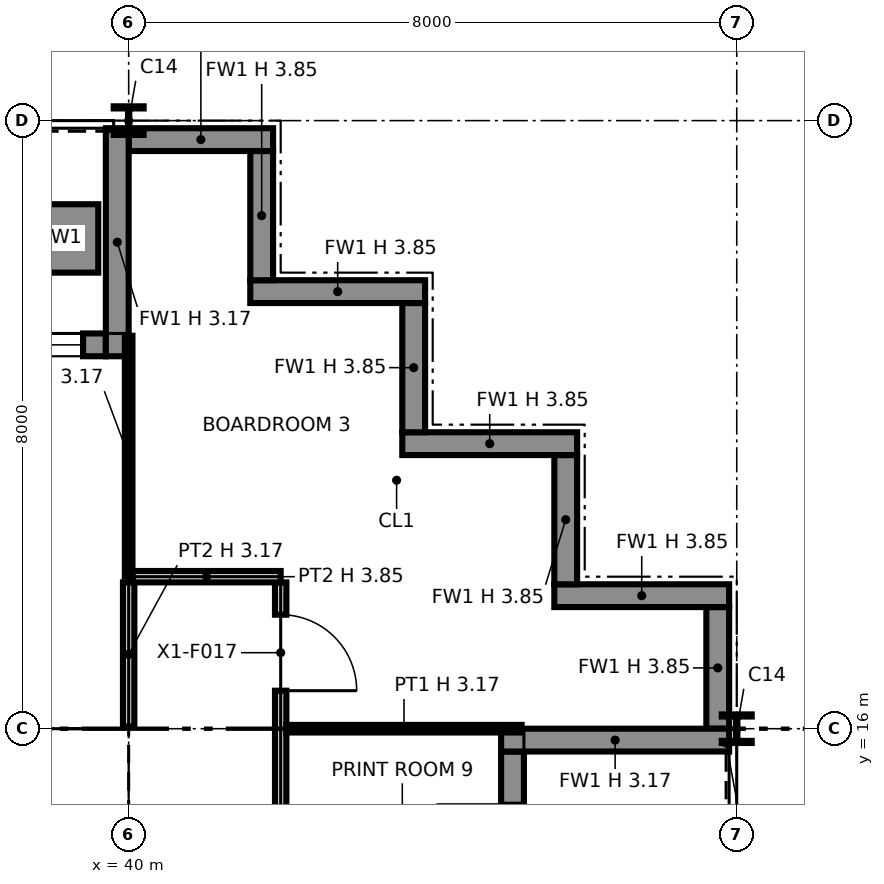
"""IFC4 building model, lengths in metres.
Left out: names, types, materials, properties, quantities, classifications, styles, units other than length and angle.
Written with IfcOpenShell. Run it as: python <this file> out.ifc"""

import sys

from ifc_helpers import new_model, si_unit, direction, frame, frame_2d, origin, origin_2d, place, context, subcontext, project, spatial, polyline, rectangle, i_section, outline, extrude, element, fill, save


model = new_model("IFC4")
c1 = context("Model", 3, precision=1e-05, world=origin(), true_north=direction((0.0, 1.0)))
c2 = subcontext(c1, "Body", "Model", "MODEL_VIEW")
j1 = project(units=[si_unit("LENGTHUNIT", "METRE"), si_unit("PLANEANGLEUNIT", "RADIAN")], contexts=[c1])
p1 = place(None, origin())
s1 = spatial("IfcSite", under=j1, at=p1, CompositionType="ELEMENT")
p2 = place(p1, origin())
s2 = spatial("IfcBuilding", under=s1, at=p2, CompositionType="ELEMENT")
p3 = place(p2, frame((0.0, 0.0, 251.0)))
s3 = spatial("IfcBuildingStorey", under=s2, at=p3, CompositionType="ELEMENT", Elevation=251.0)
p4 = place(p3, frame((40.0, 16.0, 0.0), z_axis=(0.0, 0.0, 1.0), x_axis=(1.0, 0.0, 0.0)))
e1 = element("IfcColumn", 1, at=p4, inside=s3, PredefinedType="COLUMN", context=c2, shape_type="SweptSolid", body=[
    extrude(i_section(OverallWidth=0.371, OverallDepth=0.361, WebThickness=0.012, FlangeThickness=0.02, at=origin_2d()), origin(), (0.0, 0.0, 1.0), 3.85),
])
for number, where, z_axis, x_axis in (
    (2, (40.0, 24.0, 0.0), (0.0, 0.0, 1.0), (1.0, 0.0, 0.0)),
    (3, (48.0, 16.0, 0.0), (0.0, 0.0, 1.0), (1.0, 0.0, 0.0)),
):
    element("IfcColumn", number, at=place(p3, frame(where, z_axis=z_axis, x_axis=x_axis)), inside=s3, PredefinedType="COLUMN", context=c2, shape_type="SweptSolid", body=[
        extrude(i_section(OverallWidth=0.394, OverallDepth=0.376, WebThickness=0.017, FlangeThickness=0.028, at=origin_2d()), origin(), (0.0, 0.0, 1.0), 3.85),
    ])
p5 = place(p3, frame((45.05, 8.3, 0.0), z_axis=(0.0, 0.0, 1.0), x_axis=(0.0, 1.0, 0.0)))
e4 = element("IfcWall", 4, at=p5, inside=s3, PredefinedType="SOLIDWALL", context=c2, shape_type="SweptSolid", body=[
    extrude(rectangle(XDim=7.4, YDim=0.3, at=frame_2d((3.7, 0.0))), origin(), (0.0, 0.0, 1.0), 3.85),
])
p6 = place(p5, frame((0.3, 0.0, 0.9)))
e5 = element("IfcOpeningElement", 5, at=p6, cuts=e4, PredefinedType="OPENING", context=c2, shape_type="SweptSolid", body=[
    extrude(rectangle(XDim=2.8, YDim=2.2, at=frame_2d((1.4, 1.1))), frame((0.0, 0.16, 0.0), z_axis=(0.0, -1.0, 0.0), x_axis=(1.0, 0.0, 0.0)), (0.0, 0.0, 1.0), 0.32),
])
p7 = place(p5, frame((4.7, 0.0, 0.0)))
e6 = element("IfcOpeningElement", 6, at=p7, cuts=e4, PredefinedType="OPENING", context=c2, shape_type="SweptSolid", body=[
    extrude(rectangle(XDim=2.0, YDim=2.4, at=frame_2d((1.0, 1.2))), frame((0.0, 0.16, 0.0), z_axis=(0.0, -1.0, 0.0), x_axis=(1.0, 0.0, 0.0)), (0.0, 0.0, 1.0), 0.32),
])
p8 = place(p3, frame((47.9, 15.85, 0.0), z_axis=(0.0, 0.0, 1.0), x_axis=(-1.0, 0.0, 0.0)))
e7 = element("IfcWall", 7, at=p8, inside=s3, PredefinedType="SOLIDWALL", context=c2, shape_type="SweptSolid", body=[
    extrude(rectangle(XDim=3.0, YDim=0.3, at=frame_2d((1.5, 0.0))), origin(), (0.0, 0.0, 1.0), 3.171),
])
p9 = place(p3, frame((47.75, 16.0, 0.0), z_axis=(0.0, 0.0, 1.0), x_axis=(0.0, 1.0, 0.0)))
e8 = element("IfcWall", 8, at=p9, inside=s3, PredefinedType="SOLIDWALL", context=c2, shape_type="SweptSolid", body=[
    extrude(rectangle(XDim=1.6, YDim=0.3, at=frame_2d((0.8, 0.0))), origin(), (0.0, 0.0, 1.0), 3.85),
])
p10 = place(p3, frame((47.9, 17.75, 0.0), z_axis=(0.0, 0.0, 1.0), x_axis=(-1.0, 0.0, 0.0)))
e9 = element("IfcWall", 9, at=p10, inside=s3, PredefinedType="SOLIDWALL", context=c2, shape_type="SweptSolid", body=[
    extrude(rectangle(XDim=2.3, YDim=0.3, at=frame_2d((1.15, 0.0))), origin(), (0.0, 0.0, 1.0), 3.85),
])
p11 = place(p3, frame((45.75, 17.9, 0.0), z_axis=(0.0, 0.0, 1.0), x_axis=(0.0, 1.0, 0.0)))
e10 = element("IfcWall", 10, at=p11, inside=s3, PredefinedType="SOLIDWALL", context=c2, shape_type="SweptSolid", body=[
    extrude(rectangle(XDim=1.7, YDim=0.3, at=frame_2d((0.85, 0.0))), origin(), (0.0, 0.0, 1.0), 3.85),
])
p12 = place(p3, frame((45.9, 19.75, 0.0), z_axis=(0.0, 0.0, 1.0), x_axis=(-1.0, 0.0, 0.0)))
e11 = element("IfcWall", 11, at=p12, inside=s3, PredefinedType="SOLIDWALL", context=c2, shape_type="SweptSolid", body=[
    extrude(rectangle(XDim=2.3, YDim=0.3, at=frame_2d((1.15, 0.0))), origin(), (0.0, 0.0, 1.0), 3.85),
])
p13 = place(p3, frame((43.75, 19.9, 0.0), z_axis=(0.0, 0.0, 1.0), x_axis=(0.0, 1.0, 0.0)))
e12 = element("IfcWall", 12, at=p13, inside=s3, PredefinedType="SOLIDWALL", context=c2, shape_type="SweptSolid", body=[
    extrude(rectangle(XDim=1.7, YDim=0.3, at=frame_2d((0.85, 0.0))), origin(), (0.0, 0.0, 1.0), 3.85),
])
p14 = place(p3, frame((43.9, 21.75, 0.0), z_axis=(0.0, 0.0, 1.0), x_axis=(-1.0, 0.0, 0.0)))
e13 = element("IfcWall", 13, at=p14, inside=s3, PredefinedType="SOLIDWALL", context=c2, shape_type="SweptSolid", body=[
    extrude(rectangle(XDim=2.3, YDim=0.3, at=frame_2d((1.15, 0.0))), origin(), (0.0, 0.0, 1.0), 3.85),
])
p15 = place(p3, frame((41.75, 21.9, 0.0), z_axis=(0.0, 0.0, 1.0), x_axis=(0.0, 1.0, 0.0)))
e14 = element("IfcWall", 14, at=p15, inside=s3, PredefinedType="SOLIDWALL", context=c2, shape_type="SweptSolid", body=[
    extrude(rectangle(XDim=1.7, YDim=0.3, at=frame_2d((0.85, 0.0))), origin(), (0.0, 0.0, 1.0), 3.85),
])
p16 = place(p3, frame((41.9, 23.75, 0.0), z_axis=(0.0, 0.0, 1.0), x_axis=(-1.0, 0.0, 0.0)))
e15 = element("IfcWall", 15, at=p16, inside=s3, PredefinedType="SOLIDWALL", context=c2, shape_type="SweptSolid", body=[
    extrude(rectangle(XDim=1.9, YDim=0.3, at=frame_2d((0.95, 0.0))), origin(), (0.0, 0.0, 1.0), 3.85),
])
p17 = place(p3, frame((39.7, 21.05, 0.0), z_axis=(0.0, 0.0, 1.0), x_axis=(-1.0, 0.0, 0.0)))
e16 = element("IfcWall", 16, at=p17, inside=s3, PredefinedType="SOLIDWALL", context=c2, shape_type="SweptSolid", body=[
    extrude(rectangle(XDim=7.4, YDim=0.3, at=frame_2d((3.7, 0.0))), origin(), (0.0, 0.0, 1.0), 3.85),
])
p18 = place(p17, frame((0.3, 0.0, 0.9)))
e17 = element("IfcOpeningElement", 17, at=p18, cuts=e16, PredefinedType="OPENING", context=c2, shape_type="SweptSolid", body=[
    extrude(rectangle(XDim=2.8, YDim=2.2, at=frame_2d((1.4, 1.1))), frame((0.0, 0.16, 0.0), z_axis=(0.0, -1.0, 0.0), x_axis=(1.0, 0.0, 0.0)), (0.0, 0.0, 1.0), 0.32),
])
p19 = place(p17, frame((4.7, 0.0, 0.0)))
e18 = element("IfcOpeningElement", 18, at=p19, cuts=e16, PredefinedType="OPENING", context=c2, shape_type="SweptSolid", body=[
    extrude(rectangle(XDim=2.0, YDim=2.4, at=frame_2d((1.0, 1.2))), frame((0.0, 0.16, 0.0), z_axis=(0.0, -1.0, 0.0), x_axis=(1.0, 0.0, 0.0)), (0.0, 0.0, 1.0), 0.32),
])
p20 = place(p3, frame((39.85, 23.9, 0.0), z_axis=(0.0, 0.0, 1.0), x_axis=(0.0, -1.0, 0.0)))
e19 = element("IfcWall", 19, at=p20, inside=s3, PredefinedType="SOLIDWALL", context=c2, shape_type="SweptSolid", body=[
    extrude(rectangle(XDim=3.0, YDim=0.3, at=frame_2d((1.5, 0.0))), origin(), (0.0, 0.0, 1.0), 3.171),
])
p21 = place(p3, frame((39.6, 22.45, 0.0), z_axis=(0.0, 0.0, 1.0), x_axis=(-1.0, 0.0, 0.0)))
e20 = element("IfcWall", 20, at=p21, inside=s3, PredefinedType="SOLIDWALL", context=c2, shape_type="SweptSolid", body=[
    extrude(rectangle(XDim=3.2, YDim=0.9, at=frame_2d((1.6, 0.0))), origin(), (0.0, 0.0, 1.0), 0.6),
])
p22 = place(p3, frame((24.65, 15.25, 0.0), z_axis=(0.0, 0.0, 1.0), x_axis=(1.0, 0.0, 0.0)))
e21 = element("IfcWall", 21, at=p22, inside=s3, PredefinedType="PARTITIONING", context=c2, shape_type="SweptSolid", body=[
    extrude(outline(polyline([(0.0, 0.0), (14.7, 0.0), (14.7, 3.85), (7.438, 3.85), (7.438, 3.308), (7.262, 3.308), (7.261, 3.85), (0.0, 3.85), (0.0, 0.0)])), frame((0.0, 0.1, 0.0), z_axis=(0.0, -1.0, 0.0), x_axis=(1.0, 0.0, 0.0)), (0.0, 0.0, 1.0), 0.2),
])
p23 = place(p22, frame((2.85, 0.0, 0.0)))
e22 = element("IfcOpeningElement", 22, at=p23, cuts=e21, PredefinedType="OPENING", context=c2, shape_type="SweptSolid", body=[
    extrude(rectangle(XDim=1.8, YDim=2.1, at=frame_2d((0.9, 1.05))), frame((0.0, 0.11, 0.0), z_axis=(0.0, -1.0, 0.0), x_axis=(1.0, 0.0, 0.0)), (0.0, 0.0, 1.0), 0.22),
])
p24 = place(p22, frame((9.95, 0.0, 0.0), z_axis=(0.0, 0.0, 1.0), x_axis=(-1.0, 0.0, 0.0)))
e23 = element("IfcOpeningElement", 23, at=p24, cuts=e21, PredefinedType="OPENING", context=c2, shape_type="SweptSolid", body=[
    extrude(rectangle(XDim=1.4, YDim=2.1, at=frame_2d((0.7, 1.05))), frame((0.0, 0.11, 0.0), z_axis=(0.0, -1.0, 0.0), x_axis=(1.0, 0.0, 0.0)), (0.0, 0.0, 1.0), 0.22),
])
p25 = place(p22, frame((13.4, 0.0, 0.0), z_axis=(0.0, 0.0, 1.0), x_axis=(-1.0, 0.0, 0.0)))
e24 = element("IfcOpeningElement", 24, at=p25, cuts=e21, PredefinedType="OPENING", context=c2, shape_type="SweptSolid", body=[
    extrude(rectangle(XDim=1.4, YDim=2.1, at=frame_2d((0.7, 1.05))), frame((0.0, 0.11, 0.0), z_axis=(0.0, -1.0, 0.0), x_axis=(1.0, 0.0, 0.0)), (0.0, 0.0, 1.0), 0.22),
])
p26 = place(p3, frame((39.25, 8.85, 0.0), z_axis=(0.0, 0.0, 1.0), x_axis=(0.0, 1.0, 0.0)))
e25 = element("IfcWall", 25, at=p26, inside=s3, PredefinedType="PARTITIONING", context=c2, shape_type="SweptSolid", body=[
    extrude(rectangle(XDim=6.3, YDim=0.2, at=frame_2d((3.15, 0.0))), origin(), (0.0, 0.0, 1.0), 3.85),
])
p27 = place(p3, frame((42.0, 6.0, 0.0), z_axis=(0.0, 0.0, 1.0), x_axis=(0.0, 1.0, 0.0)))
e26 = element("IfcWall", 26, at=p27, inside=s3, PredefinedType="PARTITIONING", context=c2, shape_type="SweptSolid", body=[
    extrude(outline(polyline([(0.0, 0.0), (11.925, 0.0), (11.925, 3.85), (10.3, 3.85), (10.298, 3.172), (9.702, 3.172), (9.7, 3.85), (6.3, 3.85), (6.298, 3.172), (5.702, 3.172), (5.7, 3.85), (2.3, 3.85), (2.298, 3.172), (1.702, 3.172), (1.7, 3.85), (0.0, 3.85), (0.0, 0.0)])), frame((0.0, 0.075, 0.0), z_axis=(0.0, -1.0, 0.0), x_axis=(1.0, 0.0, 0.0)), (0.0, 0.0, 1.0), 0.15),
])
p28 = place(p27, frame((4.5, 0.0, 0.0), z_axis=(0.0, 0.0, 1.0), x_axis=(-1.0, 0.0, 0.0)))
e27 = element("IfcOpeningElement", 27, at=p28, cuts=e26, PredefinedType="OPENING", context=c2, shape_type="SweptSolid", body=[
    extrude(rectangle(XDim=1.0, YDim=2.1, at=frame_2d((0.5, 1.05))), frame((0.0, 0.085, 0.0), z_axis=(0.0, -1.0, 0.0), x_axis=(1.0, 0.0, 0.0)), (0.0, 0.0, 1.0), 0.17),
])
p29 = place(p27, frame((8.5, 0.0, 0.0), z_axis=(0.0, 0.0, 1.0), x_axis=(-1.0, 0.0, 0.0)))
e28 = element("IfcOpeningElement", 28, at=p29, cuts=e26, PredefinedType="OPENING", context=c2, shape_type="SweptSolid", body=[
    extrude(rectangle(XDim=1.0, YDim=2.1, at=frame_2d((0.5, 1.05))), frame((0.0, 0.085, 0.0), z_axis=(0.0, -1.0, 0.0), x_axis=(1.0, 0.0, 0.0)), (0.0, 0.0, 1.0), 0.17),
])
p30 = place(p27, frame((11.5, 0.0, 0.0), z_axis=(0.0, 0.0, 1.0), x_axis=(-1.0, 0.0, 0.0)))
e29 = element("IfcOpeningElement", 29, at=p30, cuts=e26, PredefinedType="OPENING", context=c2, shape_type="SweptSolid", body=[
    extrude(rectangle(XDim=1.0, YDim=2.1, at=frame_2d((0.5, 1.05))), frame((0.0, 0.085, 0.0), z_axis=(0.0, -1.0, 0.0), x_axis=(1.0, 0.0, 0.0)), (0.0, 0.0, 1.0), 0.17),
])
p31 = place(p3, frame((42.075, 16.0, 0.0), z_axis=(0.0, 0.0, 1.0), x_axis=(1.0, 0.0, 0.0)))
e30 = element("IfcWall", 30, at=p31, inside=s3, PredefinedType="PARTITIONING", context=c2, shape_type="SweptSolid", body=[
    extrude(rectangle(XDim=3.095, YDim=0.1, at=frame_2d((1.547, 0.0))), origin(), (0.0, 0.0, 1.0), 3.172),
])
p32 = place(p3, frame((40.0, 16.03, 0.0), z_axis=(0.0, 0.0, 1.0), x_axis=(0.0, 1.0, 0.0)))
e31 = element("IfcWall", 31, at=p32, inside=s3, PredefinedType="PARTITIONING", context=c2, shape_type="SweptSolid", body=[
    extrude(rectangle(XDim=1.895, YDim=0.15, at=frame_2d((0.948, 0.0))), origin(), (0.0, 0.0, 1.0), 3.172),
])
p33 = place(p3, frame((40.05, 18.0, 0.0), z_axis=(0.0, 0.0, 1.0), x_axis=(1.0, 0.0, 0.0)))
e32 = element("IfcWall", 32, at=p33, inside=s3, PredefinedType="PARTITIONING", context=c2, shape_type="SweptSolid", body=[
    extrude(rectangle(XDim=1.95, YDim=0.15, at=frame_2d((0.975, 0.0))), origin(), (0.0, 0.0, 1.0), 3.85),
])
p34 = place(p3, frame((40.0, 18.0, 0.0), z_axis=(0.0, 0.0, 1.0), x_axis=(0.0, 1.0, 0.0)))
e33 = element("IfcWall", 33, at=p34, inside=s3, PredefinedType="PARTITIONING", context=c2, shape_type="SweptSolid", body=[
    extrude(rectangle(XDim=3.17, YDim=0.1, at=frame_2d((1.585, 0.0))), origin(), (0.0, 0.0, 1.0), 3.172),
])
p35 = place(p18, origin())
e34 = element("IfcWindow", 34, at=p35, inside=s3, PartitioningType="SINGLE_PANEL", PredefinedType="WINDOW", context=c2, shape_type="SweptSolid", body=[
    extrude(rectangle(XDim=2.8, YDim=2.2, at=frame_2d((1.4, 1.1))), frame((0.0, 0.03, 0.0), z_axis=(0.0, -1.0, 0.0), x_axis=(1.0, 0.0, 0.0)), (0.0, 0.0, 1.0), 0.06),
])
fill(e17, e34)
p36 = place(p30, origin())
e35 = element("IfcDoor", 35, at=p36, inside=s3, OperationType="SINGLE_SWING_RIGHT", PredefinedType="DOOR", context=c2, shape_type="SweptSolid", body=[
    extrude(rectangle(XDim=1.0, YDim=2.1, at=frame_2d((0.5, 1.05))), frame((0.0, 0.025, 0.0), z_axis=(0.0, -1.0, 0.0), x_axis=(1.0, 0.0, 0.0)), (0.0, 0.0, 1.0), 0.05),
])
fill(e29, e35)
save(model, sys.argv[1])
